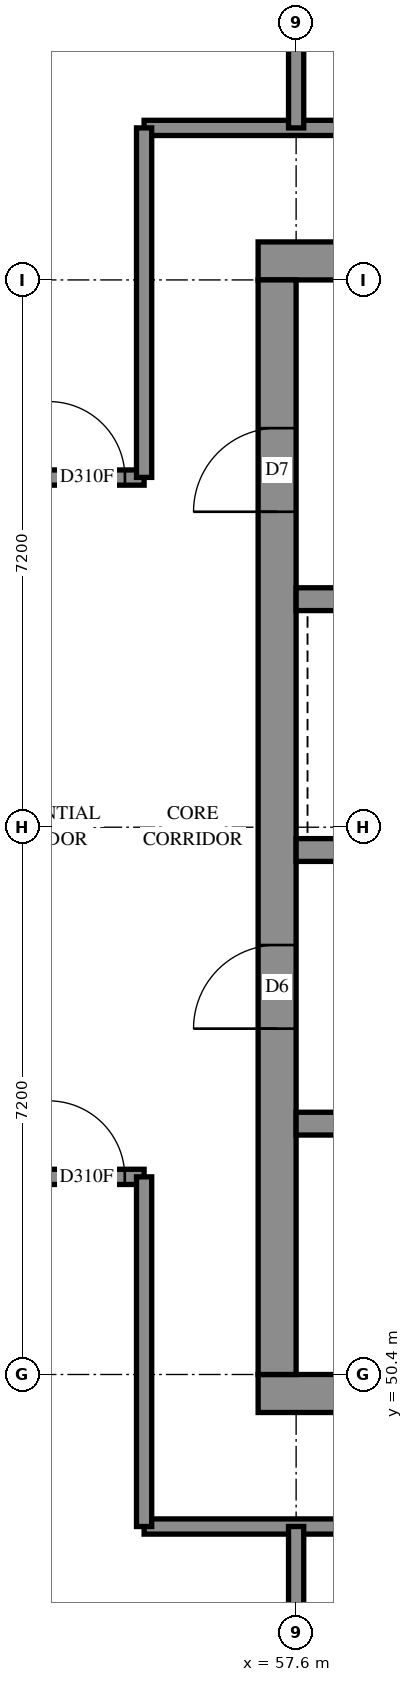
"""IFC4 building model, lengths in metres.
Left out: names, types, materials, properties, quantities, classifications, styles, units other than length and angle.
Written with IfcOpenShell. Run it as: python <this file> out.ifc"""

import sys

from ifc_helpers import new_model, si_unit, direction, frame, frame_2d, origin, place, context, subcontext, project, spatial, rectangle, extrude, element, fill, save


model = new_model("IFC4")
c1 = context("Model", 3, precision=1e-05, world=origin(), true_north=direction((0.0, 1.0)))
c2 = subcontext(c1, "Body", "Model", "MODEL_VIEW")
j1 = project(units=[si_unit("LENGTHUNIT", "METRE"), si_unit("PLANEANGLEUNIT", "RADIAN")], contexts=[c1])
p1 = place(None, origin())
s1 = spatial("IfcSite", under=j1, at=p1, CompositionType="ELEMENT")
p2 = place(p1, origin())
s2 = spatial("IfcBuilding", under=s1, at=p2, CompositionType="ELEMENT")
p3 = place(p2, frame((0.0, 0.0, 196.4)))
s3 = spatial("IfcBuildingStorey", under=s2, at=p3, CompositionType="ELEMENT", Elevation=196.4)
p4 = place(p3, frame((57.1, 50.15, -0.3), z_axis=(0.0, 0.0, 1.0), x_axis=(1.0, 0.0, 0.0)))
e1 = element("IfcWall", 1, at=p4, inside=s3, PredefinedType="SHEAR", context=c2, shape_type="SweptSolid", body=[
    extrude(rectangle(XDim=15.4, YDim=0.5, at=frame_2d((7.7, 0.0))), origin(), (0.0, 0.0, 1.0), 2.7),
])
p5 = place(p3, frame((57.1, 65.05, -0.3), z_axis=(0.0, 0.0, 1.0), x_axis=(1.0, 0.0, 0.0)))
e2 = element("IfcWall", 2, at=p5, inside=s3, PredefinedType="SHEAR", context=c2, shape_type="SweptSolid", body=[
    extrude(rectangle(XDim=15.4, YDim=0.5, at=frame_2d((7.7, 0.0))), origin(), (0.0, 0.0, 1.0), 2.7),
])
p6 = place(p5, frame((10.5, 0.0, 0.3)))
e3 = element("IfcOpeningElement", 3, at=p6, cuts=e2, PredefinedType="OPENING", context=c2, shape_type="SweptSolid", body=[
    extrude(rectangle(XDim=0.8, YDim=2.1, at=frame_2d((0.4, 1.05))), frame((0.0, 0.26, 0.0), z_axis=(0.0, -1.0, 0.0), x_axis=(1.0, 0.0, 0.0)), (0.0, 0.0, 1.0), 0.52),
])
p7 = place(p3, frame((57.35, 50.4, -0.3), z_axis=(0.0, 0.0, 1.0), x_axis=(0.0, 1.0, 0.0)))
e4 = element("IfcWall", 4, at=p7, inside=s3, PredefinedType="SHEAR", context=c2, shape_type="SweptSolid", body=[
    extrude(rectangle(XDim=14.4, YDim=0.5, at=frame_2d((7.2, 0.0))), origin(), (0.0, 0.0, 1.0), 2.7),
])
p8 = place(p7, frame((4.55, 0.0, 0.3)))
e5 = element("IfcOpeningElement", 5, at=p8, cuts=e4, PredefinedType="OPENING", context=c2, shape_type="SweptSolid", body=[
    extrude(rectangle(XDim=1.1, YDim=2.1, at=frame_2d((0.55, 1.05))), frame((0.0, 0.26, 0.0), z_axis=(0.0, -1.0, 0.0), x_axis=(1.0, 0.0, 0.0)), (0.0, 0.0, 1.0), 0.52),
])
p9 = place(p7, frame((11.35, 0.0, 0.3)))
e6 = element("IfcOpeningElement", 6, at=p9, cuts=e4, PredefinedType="OPENING", context=c2, shape_type="SweptSolid", body=[
    extrude(rectangle(XDim=1.1, YDim=2.1, at=frame_2d((0.55, 1.05))), frame((0.0, 0.26, 0.0), z_axis=(0.0, -1.0, 0.0), x_axis=(1.0, 0.0, 0.0)), (0.0, 0.0, 1.0), 0.52),
])
p10 = place(p3, frame((57.6, 53.7, 0.0), z_axis=(0.0, 0.0, 1.0), x_axis=(1.0, 0.0, 0.0)))
e7 = element("IfcWall", 7, at=p10, inside=s3, PredefinedType="SOLIDWALL", context=c2, shape_type="SweptSolid", body=[
    extrude(rectangle(XDim=14.4, YDim=0.3, at=frame_2d((7.2, 0.0))), origin(), (0.0, 0.0, 1.0), 3.1),
])
p11 = place(p10, frame((1.35, 0.0, 0.0)))
e8 = element("IfcOpeningElement", 8, at=p11, cuts=e7, PredefinedType="OPENING", context=c2, shape_type="SweptSolid", body=[
    extrude(rectangle(XDim=0.9, YDim=2.1, at=frame_2d((0.45, 1.05))), frame((0.0, 0.16, 0.0), z_axis=(0.0, -1.0, 0.0), x_axis=(1.0, 0.0, 0.0)), (0.0, 0.0, 1.0), 0.32),
])
p12 = place(p10, frame((4.95, 0.0, 0.0)))
e9 = element("IfcOpeningElement", 9, at=p12, cuts=e7, PredefinedType="OPENING", context=c2, shape_type="SweptSolid", body=[
    extrude(rectangle(XDim=0.9, YDim=2.1, at=frame_2d((0.45, 1.05))), frame((0.0, 0.16, 0.0), z_axis=(0.0, -1.0, 0.0), x_axis=(1.0, 0.0, 0.0)), (0.0, 0.0, 1.0), 0.32),
])
p13 = place(p10, frame((8.55, 0.0, 0.0)))
e10 = element("IfcOpeningElement", 10, at=p13, cuts=e7, PredefinedType="OPENING", context=c2, shape_type="SweptSolid", body=[
    extrude(rectangle(XDim=0.9, YDim=2.1, at=frame_2d((0.45, 1.05))), frame((0.0, 0.16, 0.0), z_axis=(0.0, -1.0, 0.0), x_axis=(1.0, 0.0, 0.0)), (0.0, 0.0, 1.0), 0.32),
])
p14 = place(p10, frame((12.05, 0.0, 0.0)))
e11 = element("IfcOpeningElement", 11, at=p14, cuts=e7, PredefinedType="OPENING", context=c2, shape_type="SweptSolid", body=[
    extrude(rectangle(XDim=1.1, YDim=2.1, at=frame_2d((0.55, 1.05))), frame((0.0, 0.16, 0.0), z_axis=(0.0, -1.0, 0.0), x_axis=(1.0, 0.0, 0.0)), (0.0, 0.0, 1.0), 0.32),
])
p15 = place(p3, frame((57.6, 57.3, 0.0), z_axis=(0.0, 0.0, 1.0), x_axis=(1.0, 0.0, 0.0)))
e12 = element("IfcWall", 12, at=p15, inside=s3, PredefinedType="SOLIDWALL", context=c2, shape_type="SweptSolid", body=[
    extrude(rectangle(XDim=14.4, YDim=0.3, at=frame_2d((7.2, 0.0))), origin(), (0.0, 0.0, 1.0), 3.1),
])
p16 = place(p15, frame((1.25, 0.0, 0.0)))
e13 = element("IfcOpeningElement", 13, at=p16, cuts=e12, PredefinedType="OPENING", context=c2, shape_type="SweptSolid", body=[
    extrude(rectangle(XDim=1.1, YDim=2.1, at=frame_2d((0.55, 1.05))), frame((0.0, 0.16, 0.0), z_axis=(0.0, -1.0, 0.0), x_axis=(1.0, 0.0, 0.0)), (0.0, 0.0, 1.0), 0.32),
])
p17 = place(p15, frame((4.85, 0.0, 0.0)))
e14 = element("IfcOpeningElement", 14, at=p17, cuts=e12, PredefinedType="OPENING", context=c2, shape_type="SweptSolid", body=[
    extrude(rectangle(XDim=1.1, YDim=2.1, at=frame_2d((0.55, 1.05))), frame((0.0, 0.16, 0.0), z_axis=(0.0, -1.0, 0.0), x_axis=(1.0, 0.0, 0.0)), (0.0, 0.0, 1.0), 0.32),
])
p18 = place(p15, frame((8.45, 0.0, 0.0)))
e15 = element("IfcOpeningElement", 15, at=p18, cuts=e12, PredefinedType="OPENING", context=c2, shape_type="SweptSolid", body=[
    extrude(rectangle(XDim=1.1, YDim=2.1, at=frame_2d((0.55, 1.05))), frame((0.0, 0.16, 0.0), z_axis=(0.0, -1.0, 0.0), x_axis=(1.0, 0.0, 0.0)), (0.0, 0.0, 1.0), 0.32),
])
p19 = place(p15, frame((12.05, 0.0, 0.0)))
e16 = element("IfcOpeningElement", 16, at=p19, cuts=e12, PredefinedType="OPENING", context=c2, shape_type="SweptSolid", body=[
    extrude(rectangle(XDim=1.1, YDim=2.1, at=frame_2d((0.55, 1.05))), frame((0.0, 0.16, 0.0), z_axis=(0.0, -1.0, 0.0), x_axis=(1.0, 0.0, 0.0)), (0.0, 0.0, 1.0), 0.32),
])
p20 = place(p3, frame((57.6, 60.6, 0.0), z_axis=(0.0, 0.0, 1.0), x_axis=(1.0, 0.0, 0.0)))
e17 = element("IfcWall", 17, at=p20, inside=s3, PredefinedType="SOLIDWALL", context=c2, shape_type="SweptSolid", body=[
    extrude(rectangle(XDim=7.2, YDim=0.3, at=frame_2d((3.6, 0.0))), origin(), (0.0, 0.0, 1.0), 3.1),
])
p21 = place(p3, frame((55.6, 48.4, 0.0), z_axis=(0.0, 0.0, 1.0), x_axis=(1.0, 0.0, 0.0)))
e18 = element("IfcWall", 18, at=p21, inside=s3, PredefinedType="PARTITIONING", context=c2, shape_type="SweptSolid", body=[
    extrude(rectangle(XDim=18.4, YDim=0.2, at=frame_2d((9.2, 0.0))), origin(), (0.0, 0.0, 1.0), 3.1),
])
p22 = place(p21, frame((5.862, 0.0, 0.0)))
e19 = element("IfcOpeningElement", 19, at=p22, cuts=e18, PredefinedType="OPENING", context=c2, shape_type="SweptSolid", body=[
    extrude(rectangle(XDim=1.0, YDim=2.1, at=frame_2d((0.5, 1.05))), frame((0.0, 0.11, 0.0), z_axis=(0.0, -1.0, 0.0), x_axis=(1.0, 0.0, 0.0)), (0.0, 0.0, 1.0), 0.22),
])
p23 = place(p21, frame((11.5, 0.0, 0.0)))
e20 = element("IfcOpeningElement", 20, at=p23, cuts=e18, PredefinedType="OPENING", context=c2, shape_type="SweptSolid", body=[
    extrude(rectangle(XDim=0.9, YDim=2.1, at=frame_2d((0.45, 1.05))), frame((0.0, 0.11, 0.0), z_axis=(0.0, -1.0, 0.0), x_axis=(1.0, 0.0, 0.0)), (0.0, 0.0, 1.0), 0.22),
])
p24 = place(p21, frame((13.2, 0.0, 0.0)))
e21 = element("IfcOpeningElement", 21, at=p24, cuts=e18, PredefinedType="OPENING", context=c2, shape_type="SweptSolid", body=[
    extrude(rectangle(XDim=0.9, YDim=2.1, at=frame_2d((0.45, 1.05))), frame((0.0, 0.11, 0.0), z_axis=(0.0, -1.0, 0.0), x_axis=(1.0, 0.0, 0.0)), (0.0, 0.0, 1.0), 0.22),
])
p25 = place(p3, frame((55.6, 66.8, 0.0), z_axis=(0.0, 0.0, 1.0), x_axis=(1.0, 0.0, 0.0)))
e22 = element("IfcWall", 22, at=p25, inside=s3, PredefinedType="PARTITIONING", context=c2, shape_type="SweptSolid", body=[
    extrude(rectangle(XDim=18.4, YDim=0.2, at=frame_2d((9.2, 0.0))), origin(), (0.0, 0.0, 1.0), 3.1),
])
p26 = place(p25, frame((5.886, 0.0, 0.0)))
e23 = element("IfcOpeningElement", 23, at=p26, cuts=e22, PredefinedType="OPENING", context=c2, shape_type="SweptSolid", body=[
    extrude(rectangle(XDim=1.0, YDim=2.1, at=frame_2d((0.5, 1.05))), frame((0.0, 0.11, 0.0), z_axis=(0.0, -1.0, 0.0), x_axis=(1.0, 0.0, 0.0)), (0.0, 0.0, 1.0), 0.22),
])
p27 = place(p25, frame((13.389, 0.0, 0.0)))
e24 = element("IfcOpeningElement", 24, at=p27, cuts=e22, PredefinedType="OPENING", context=c2, shape_type="SweptSolid", body=[
    extrude(rectangle(XDim=1.0, YDim=2.1, at=frame_2d((0.5, 1.05))), frame((0.0, 0.11, 0.0), z_axis=(0.0, -1.0, 0.0), x_axis=(1.0, 0.0, 0.0)), (0.0, 0.0, 1.0), 0.22),
])
p28 = place(p3, frame((40.602, 62.2, 0.0), z_axis=(0.0, 0.0, 1.0), x_axis=(1.0, 0.0, 0.0)))
e25 = element("IfcWall", 25, at=p28, inside=s3, PredefinedType="PARTITIONING", context=c2, shape_type="SweptSolid", body=[
    extrude(rectangle(XDim=14.998, YDim=0.2, at=frame_2d((7.499, 0.0))), origin(), (0.0, 0.0, 1.0), 3.1),
])
p29 = place(p28, frame((1.306, 0.0, 0.0)))
e26 = element("IfcOpeningElement", 26, at=p29, cuts=e25, PredefinedType="OPENING", context=c2, shape_type="SweptSolid", body=[
    extrude(rectangle(XDim=0.9, YDim=2.1, at=frame_2d((0.45, 1.05))), frame((0.0, 0.11, 0.0), z_axis=(0.0, -1.0, 0.0), x_axis=(1.0, 0.0, 0.0)), (0.0, 0.0, 1.0), 0.22),
])
p30 = place(p28, frame((8.548, 0.0, 0.0)))
e27 = element("IfcOpeningElement", 27, at=p30, cuts=e25, PredefinedType="OPENING", context=c2, shape_type="SweptSolid", body=[
    extrude(rectangle(XDim=0.9, YDim=2.1, at=frame_2d((0.45, 1.05))), frame((0.0, 0.11, 0.0), z_axis=(0.0, -1.0, 0.0), x_axis=(1.0, 0.0, 0.0)), (0.0, 0.0, 1.0), 0.22),
])
p31 = place(p28, frame((10.198, 0.0, 0.0)))
e28 = element("IfcOpeningElement", 28, at=p31, cuts=e25, PredefinedType="OPENING", context=c2, shape_type="SweptSolid", body=[
    extrude(rectangle(XDim=0.9, YDim=2.1, at=frame_2d((0.45, 1.05))), frame((0.0, 0.11, 0.0), z_axis=(0.0, -1.0, 0.0), x_axis=(1.0, 0.0, 0.0)), (0.0, 0.0, 1.0), 0.22),
])
p32 = place(p28, frame((13.746, 0.0, 0.0)))
e29 = element("IfcOpeningElement", 29, at=p32, cuts=e25, PredefinedType="OPENING", context=c2, shape_type="SweptSolid", body=[
    extrude(rectangle(XDim=1.0, YDim=2.1, at=frame_2d((0.5, 1.05))), frame((0.0, 0.11, 0.0), z_axis=(0.0, -1.0, 0.0), x_axis=(1.0, 0.0, 0.0)), (0.0, 0.0, 1.0), 0.22),
])
p33 = place(p3, frame((50.4, 53.0, 0.0), z_axis=(0.0, 0.0, 1.0), x_axis=(1.0, 0.0, 0.0)))
e30 = element("IfcWall", 30, at=p33, inside=s3, PredefinedType="PARTITIONING", context=c2, shape_type="SweptSolid", body=[
    extrude(rectangle(XDim=5.2, YDim=0.2, at=frame_2d((2.6, 0.0))), origin(), (0.0, 0.0, 1.0), 3.1),
])
p34 = place(p33, frame((0.4, 0.0, 0.0)))
e31 = element("IfcOpeningElement", 31, at=p34, cuts=e30, PredefinedType="OPENING", context=c2, shape_type="SweptSolid", body=[
    extrude(rectangle(XDim=0.9, YDim=2.1, at=frame_2d((0.45, 1.05))), frame((0.0, 0.11, 0.0), z_axis=(0.0, -1.0, 0.0), x_axis=(1.0, 0.0, 0.0)), (0.0, 0.0, 1.0), 0.22),
])
p35 = place(p33, frame((3.946, 0.0, 0.0)))
e32 = element("IfcOpeningElement", 32, at=p35, cuts=e30, PredefinedType="OPENING", context=c2, shape_type="SweptSolid", body=[
    extrude(rectangle(XDim=1.0, YDim=2.1, at=frame_2d((0.5, 1.05))), frame((0.0, 0.11, 0.0), z_axis=(0.0, -1.0, 0.0), x_axis=(1.0, 0.0, 0.0)), (0.0, 0.0, 1.0), 0.22),
])
for number, where, z_axis, x_axis in (
    (33, (57.6, 43.6, 0.0), (0.0, 0.0, 1.0), (0.0, 1.0, 0.0)),
    (34, (57.6, 66.8, 0.0), (0.0, 0.0, 1.0), (0.0, 1.0, 0.0)),
):
    element("IfcWall", number, at=place(p3, frame(where, z_axis=z_axis, x_axis=x_axis)), inside=s3, PredefinedType="PARTITIONING", context=c2, shape_type="SweptSolid", body=[
        extrude(rectangle(XDim=4.8, YDim=0.2, at=frame_2d((2.4, 0.0))), origin(), (0.0, 0.0, 1.0), 3.1),
    ])
p36 = place(p3, frame((55.6, 48.4, 0.0), z_axis=(0.0, 0.0, 1.0), x_axis=(0.0, 1.0, 0.0)))
e35 = element("IfcWall", 35, at=p36, inside=s3, PredefinedType="PARTITIONING", context=c2, shape_type="SweptSolid", body=[
    extrude(rectangle(XDim=4.6, YDim=0.2, at=frame_2d((2.3, 0.0))), origin(), (0.0, 0.0, 1.0), 3.1),
])
p37 = place(p3, frame((55.6, 62.202, 0.0), z_axis=(0.0, 0.0, 1.0), x_axis=(0.0, 1.0, 0.0)))
e36 = element("IfcWall", 36, at=p37, inside=s3, PredefinedType="PARTITIONING", context=c2, shape_type="SweptSolid", body=[
    extrude(rectangle(XDim=4.598, YDim=0.2, at=frame_2d((2.299, 0.0))), origin(), (0.0, 0.0, 1.0), 3.1),
])
p38 = place(p8, origin())
e37 = element("IfcDoor", 37, at=p38, inside=s3, OperationType="DOUBLE_DOOR_SINGLE_SWING", PredefinedType="DOOR", context=c2, shape_type="SweptSolid", body=[
    extrude(rectangle(XDim=1.1, YDim=2.1, at=frame_2d((0.55, 1.05))), frame((0.0, 0.025, 0.0), z_axis=(0.0, -1.0, 0.0), x_axis=(1.0, 0.0, 0.0)), (0.0, 0.0, 1.0), 0.05),
])
fill(e5, e37)
p39 = place(p9, origin())
e38 = element("IfcDoor", 38, at=p39, inside=s3, OperationType="SINGLE_SWING_LEFT", PredefinedType="DOOR", context=c2, shape_type="SweptSolid", body=[
    extrude(rectangle(XDim=1.1, YDim=2.1, at=frame_2d((0.55, 1.05))), frame((0.0, 0.025, 0.0), z_axis=(0.0, -1.0, 0.0), x_axis=(1.0, 0.0, 0.0)), (0.0, 0.0, 1.0), 0.05),
])
fill(e6, e38)
p40 = place(p32, origin())
e39 = element("IfcDoor", 39, at=p40, inside=s3, OperationType="SINGLE_SWING_LEFT", PredefinedType="DOOR", context=c2, shape_type="SweptSolid", body=[
    extrude(rectangle(XDim=1.0, YDim=2.1, at=frame_2d((0.5, 1.05))), frame((0.0, 0.025, 0.0), z_axis=(0.0, -1.0, 0.0), x_axis=(1.0, 0.0, 0.0)), (0.0, 0.0, 1.0), 0.05),
])
fill(e29, e39)
p41 = place(p35, origin())
e40 = element("IfcDoor", 40, at=p41, inside=s3, OperationType="SINGLE_SWING_RIGHT", PredefinedType="DOOR", context=c2, shape_type="SweptSolid", body=[
    extrude(rectangle(XDim=1.0, YDim=2.1, at=frame_2d((0.5, 1.05))), frame((0.0, 0.025, 0.0), z_axis=(0.0, -1.0, 0.0), x_axis=(1.0, 0.0, 0.0)), (0.0, 0.0, 1.0), 0.05),
])
fill(e32, e40)
save(model, sys.argv[1])
